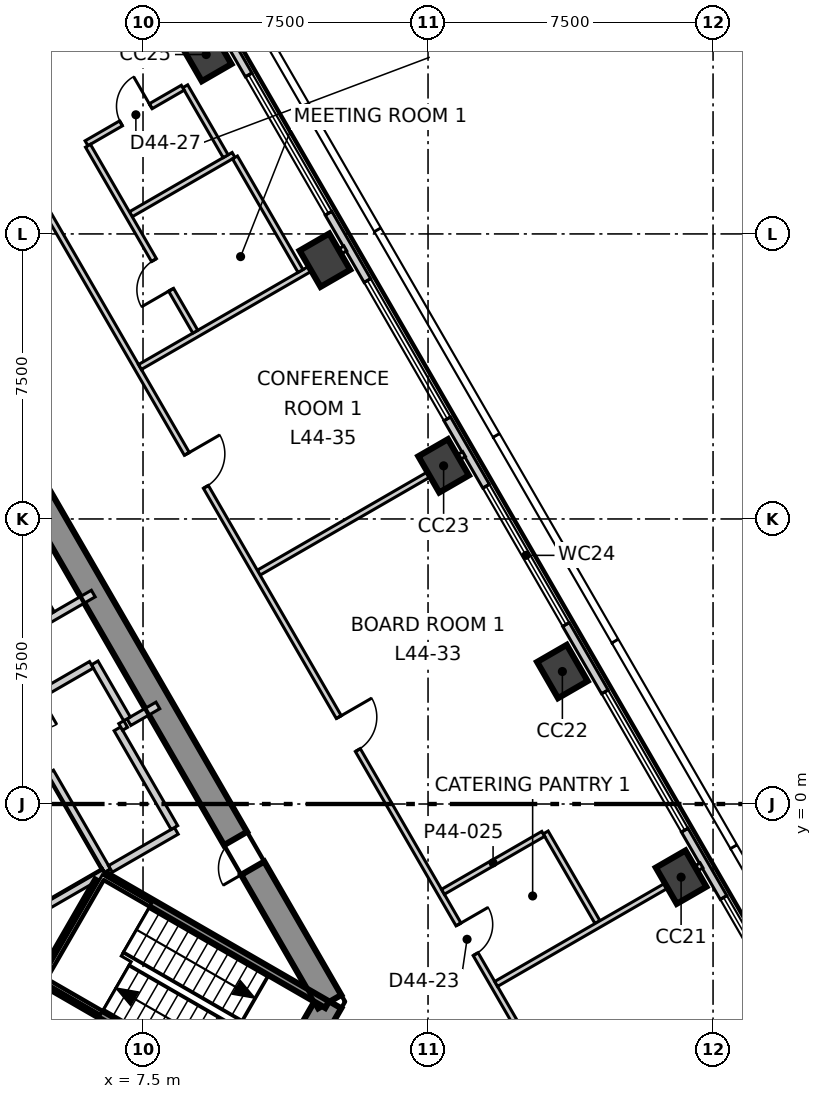
"""IFC4 building model, lengths in metres.
Left out: names, types, materials, properties, quantities, classifications, styles, units other than length and angle.
Written with IfcOpenShell. Run it as: python <this file> out.ifc"""

import sys

from ifc_helpers import new_model, si_unit, direction, frame, frame_2d, origin, origin_2d, place, context, subcontext, project, spatial, polyline, rectangle, outline, extrude, element, fill, save


model = new_model("IFC4")
c1 = context("Model", 3, precision=1e-05, world=origin(), true_north=direction((0.0, 1.0)))
c2 = subcontext(c1, "Body", "Model", "MODEL_VIEW")
j1 = project(units=[si_unit("LENGTHUNIT", "METRE"), si_unit("PLANEANGLEUNIT", "RADIAN")], contexts=[c1])
p1 = place(None, origin())
s1 = spatial("IfcSite", under=j1, at=p1, CompositionType="ELEMENT")
p2 = place(p1, origin())
s2 = spatial("IfcBuilding", under=s1, at=p2, CompositionType="ELEMENT")
p3 = place(p2, frame((0.0, 0.0, 191.3)))
s3 = spatial("IfcBuildingStorey", under=s2, at=p3, CompositionType="ELEMENT", Elevation=191.3)
p4 = place(p3, frame((10.71, -8.15, -0.3), z_axis=(0.0, 0.0, 1.0), x_axis=(0.49999337185, 0.866029230515, 0.0)))
e1 = element("IfcWall", 1, at=p4, inside=s3, PredefinedType="SHEAR", context=c2, shape_type="SweptSolid", body=[
    extrude(outline(polyline([(-0.202, -0.35), (1.703, -0.35), (3.608, -0.35), (3.204, 0.35), (1.703, 0.35), (0.202, 0.35), (-0.202, -0.35)])), origin(), (0.0, 0.0, 1.0), 4.0),
])
p5 = place(p4, frame((1.003, 0.0, 0.3)))
e2 = element("IfcOpeningElement", 2, at=p5, cuts=e1, PredefinedType="OPENING", context=c2, shape_type="SweptSolid", body=[
    extrude(rectangle(XDim=1.4, YDim=2.1, at=frame_2d((0.7, 1.05))), frame((0.0, 0.36, 0.0), z_axis=(0.0, -1.0, 0.0), x_axis=(1.0, 0.0, 0.0)), (0.0, 0.0, 1.0), 0.72),
])
p6 = place(p3, frame((12.413, -5.2, -0.3), z_axis=(0.0, 0.0, 1.0), x_axis=(-0.500011533395, 0.866018744874, 0.0)))
e3 = element("IfcWall", 3, at=p6, inside=s3, PredefinedType="SHEAR", context=c2, shape_type="SweptSolid", body=[
    extrude(outline(polyline([(-0.202, -0.35), (1.782, -0.35), (3.766, -0.35), (5.75, -0.35), (7.734, -0.35), (9.718, -0.35), (11.702, -0.35), (13.686, -0.35), (15.67, -0.35), (17.654, -0.35), (19.638, -0.35), (21.622, -0.35), (21.218, 0.35), (19.307, 0.35), (17.397, 0.35), (15.486, 0.35), (13.576, 0.35), (11.665, 0.35), (9.755, 0.35), (7.844, 0.35), (5.934, 0.35), (4.023, 0.35), (2.113, 0.35), (0.202, 0.35), (-0.202, -0.35)])), origin(), (0.0, 0.0, 1.0), 4.0),
])
p7 = place(p6, frame((4.055, 0.0, 0.3)))
e4 = element("IfcOpeningElement", 4, at=p7, cuts=e3, PredefinedType="OPENING", context=c2, shape_type="SweptSolid", body=[
    extrude(rectangle(XDim=0.9, YDim=2.1, at=frame_2d((0.45, 1.05))), frame((0.0, 0.36, 0.0), z_axis=(0.0, -1.0, 0.0), x_axis=(1.0, 0.0, 0.0)), (0.0, 0.0, 1.0), 0.72),
])
p8 = place(p6, frame((16.465, 0.0, 0.3)))
e5 = element("IfcOpeningElement", 5, at=p8, cuts=e3, PredefinedType="OPENING", context=c2, shape_type="SweptSolid", body=[
    extrude(rectangle(XDim=0.9, YDim=2.1, at=frame_2d((0.45, 1.05))), frame((0.0, 0.36, 0.0), z_axis=(0.0, -1.0, 0.0), x_axis=(1.0, 0.0, 0.0)), (0.0, 0.0, 1.0), 0.72),
])
for number, where, z_axis, x_axis in (
    (6, (21.659, -1.925, -0.3), (0.0, 0.0, 1.0), (-0.5, 0.866, 0.0)),
    (7, (18.535, 3.486, -0.3), (0.0, 0.0, 1.0), (-0.5, 0.866, 0.0)),
    (8, (15.41, 8.898, -0.3), (0.0, 0.0, 1.0), (-0.5, 0.866, 0.0)),
    (9, (12.286, 14.309, -0.3), (0.0, 0.0, 1.0), (-0.5, 0.866, 0.0)),
    (10, (9.162, 19.72, -0.3), (0.0, 0.0, 1.0), (-0.5, 0.866, 0.0)),
):
    element("IfcColumn", number, at=place(p3, frame(where, z_axis=z_axis, x_axis=x_axis)), inside=s3, PredefinedType="COLUMN", context=c2, shape_type="SweptSolid", body=[
        extrude(rectangle(XDim=1.1, YDim=0.9, at=origin_2d()), origin(), (0.0, 0.0, 1.0), 4.0),
    ])
p9 = place(p3, frame((29.165, -13.525, 0.0), z_axis=(0.0, 0.0, 1.0), x_axis=(-0.500008941164, 0.86602024154, 0.0)))
e11 = element("IfcWall", 11, at=p9, inside=s3, PredefinedType="ELEMENTEDWALL", context=c2, shape_type="SweptSolid", body=[
    extrude(rectangle(XDim=52.571, YDim=0.2, at=frame_2d((26.286, 0.0))), origin(), (0.0, 0.0, 1.0), 3.7),
])
p10 = place(p9, frame((2.327, 0.0, 0.9)))
e12 = element("IfcOpeningElement", 12, at=p10, cuts=e11, PredefinedType="OPENING", context=c2, shape_type="SweptSolid", body=[
    extrude(rectangle(XDim=4.2, YDim=2.5, at=frame_2d((2.1, 1.25))), frame((0.0, 0.11, 0.0), z_axis=(0.0, -1.0, 0.0), x_axis=(1.0, 0.0, 0.0)), (0.0, 0.0, 1.0), 0.22),
])
p11 = place(p9, frame((8.575, 0.0, 0.9)))
e13 = element("IfcOpeningElement", 13, at=p11, cuts=e11, PredefinedType="OPENING", context=c2, shape_type="SweptSolid", body=[
    extrude(rectangle(XDim=4.2, YDim=2.5, at=frame_2d((2.1, 1.25))), frame((0.0, 0.11, 0.0), z_axis=(0.0, -1.0, 0.0), x_axis=(1.0, 0.0, 0.0)), (0.0, 0.0, 1.0), 0.22),
])
p12 = place(p9, frame((14.823, 0.0, 0.9)))
e14 = element("IfcOpeningElement", 14, at=p12, cuts=e11, PredefinedType="OPENING", context=c2, shape_type="SweptSolid", body=[
    extrude(rectangle(XDim=4.2, YDim=2.5, at=frame_2d((2.1, 1.25))), frame((0.0, 0.11, 0.0), z_axis=(0.0, -1.0, 0.0), x_axis=(1.0, 0.0, 0.0)), (0.0, 0.0, 1.0), 0.22),
])
p13 = place(p9, frame((21.072, 0.0, 0.9)))
e15 = element("IfcOpeningElement", 15, at=p13, cuts=e11, PredefinedType="OPENING", context=c2, shape_type="SweptSolid", body=[
    extrude(rectangle(XDim=4.2, YDim=2.5, at=frame_2d((2.1, 1.25))), frame((0.0, 0.11, 0.0), z_axis=(0.0, -1.0, 0.0), x_axis=(1.0, 0.0, 0.0)), (0.0, 0.0, 1.0), 0.22),
])
p14 = place(p9, frame((27.32, 0.0, 0.9)))
e16 = element("IfcOpeningElement", 16, at=p14, cuts=e11, PredefinedType="OPENING", context=c2, shape_type="SweptSolid", body=[
    extrude(rectangle(XDim=4.2, YDim=2.5, at=frame_2d((2.1, 1.25))), frame((0.0, 0.11, 0.0), z_axis=(0.0, -1.0, 0.0), x_axis=(1.0, 0.0, 0.0)), (0.0, 0.0, 1.0), 0.22),
])
p15 = place(p9, frame((33.568, 0.0, 0.9)))
e17 = element("IfcOpeningElement", 17, at=p15, cuts=e11, PredefinedType="OPENING", context=c2, shape_type="SweptSolid", body=[
    extrude(rectangle(XDim=4.2, YDim=2.5, at=frame_2d((2.1, 1.25))), frame((0.0, 0.11, 0.0), z_axis=(0.0, -1.0, 0.0), x_axis=(1.0, 0.0, 0.0)), (0.0, 0.0, 1.0), 0.22),
])
p16 = place(p9, frame((39.816, 0.0, 0.9)))
e18 = element("IfcOpeningElement", 18, at=p16, cuts=e11, PredefinedType="OPENING", context=c2, shape_type="SweptSolid", body=[
    extrude(rectangle(XDim=4.2, YDim=2.5, at=frame_2d((2.1, 1.25))), frame((0.0, 0.11, 0.0), z_axis=(0.0, -1.0, 0.0), x_axis=(1.0, 0.0, 0.0)), (0.0, 0.0, 1.0), 0.22),
])
p17 = place(p9, frame((46.064, 0.0, 0.9)))
e19 = element("IfcOpeningElement", 19, at=p17, cuts=e11, PredefinedType="OPENING", context=c2, shape_type="SweptSolid", body=[
    extrude(rectangle(XDim=4.2, YDim=2.5, at=frame_2d((2.1, 1.25))), frame((0.0, 0.11, 0.0), z_axis=(0.0, -1.0, 0.0), x_axis=(1.0, 0.0, 0.0)), (0.0, 0.0, 1.0), 0.22),
])
p18 = place(p3, frame((10.544, 6.087, 0.0), z_axis=(0.0, 0.0, 1.0), x_axis=(0.86601944389, 0.500010322698, 0.0)))
e20 = element("IfcWall", 20, at=p18, inside=s3, PredefinedType="PARTITIONING", context=c2, shape_type="SweptSolid", body=[
    extrude(rectangle(XDim=6.24, YDim=0.15, at=frame_2d((3.12, 0.0))), origin(), (0.0, 0.0, 1.0), 3.2),
])
p19 = place(p3, frame((0.075, 24.07, 0.0), z_axis=(0.0, 0.0, 1.0), x_axis=(0.49999939571, -0.866025752671, 0.0)))
e21 = element("IfcWall", 21, at=p19, inside=s3, PredefinedType="PARTITIONING", context=c2, shape_type="SweptSolid", body=[
    extrude(rectangle(XDim=41.614, YDim=0.15, at=frame_2d((20.807, 0.0))), origin(), (0.0, 0.0, 1.0), 3.7),
])
p20 = place(p19, frame((37.015, 0.0, 0.0)))
e22 = element("IfcOpeningElement", 22, at=p20, cuts=e21, PredefinedType="OPENING", context=c2, shape_type="SweptSolid", body=[
    extrude(rectangle(XDim=1.1, YDim=2.1, at=frame_2d((0.55, 1.05))), frame((0.0, 0.085, 0.0), z_axis=(0.0, -1.0, 0.0), x_axis=(1.0, 0.0, 0.0)), (0.0, 0.0, 1.0), 0.17),
])
p21 = place(p19, frame((25.154, 0.0, 0.0)))
e23 = element("IfcOpeningElement", 23, at=p21, cuts=e21, PredefinedType="OPENING", context=c2, shape_type="SweptSolid", body=[
    extrude(rectangle(XDim=1.0, YDim=2.1, at=frame_2d((0.5, 1.05))), frame((0.0, 0.085, 0.0), z_axis=(0.0, -1.0, 0.0), x_axis=(1.0, 0.0, 0.0)), (0.0, 0.0, 1.0), 0.17),
])
p22 = place(p19, frame((31.454, 0.0, 0.0)))
e24 = element("IfcOpeningElement", 24, at=p22, cuts=e21, PredefinedType="OPENING", context=c2, shape_type="SweptSolid", body=[
    extrude(rectangle(XDim=0.9, YDim=2.1, at=frame_2d((0.45, 1.05))), frame((0.0, 0.085, 0.0), z_axis=(0.0, -1.0, 0.0), x_axis=(1.0, 0.0, 0.0)), (0.0, 0.0, 1.0), 0.17),
])
p23 = place(p19, frame((17.157, 0.0, 0.0)))
e25 = element("IfcOpeningElement", 25, at=p23, cuts=e21, PredefinedType="OPENING", context=c2, shape_type="SweptSolid", body=[
    extrude(rectangle(XDim=1.0, YDim=2.1, at=frame_2d((0.5, 1.05))), frame((0.0, 0.085, 0.0), z_axis=(0.0, -1.0, 0.0), x_axis=(1.0, 0.0, 0.0)), (0.0, 0.0, 1.0), 0.17),
])
p24 = place(p19, frame((6.609, 0.0, 0.0)))
e26 = element("IfcOpeningElement", 26, at=p24, cuts=e21, PredefinedType="OPENING", context=c2, shape_type="SweptSolid", body=[
    extrude(rectangle(XDim=1.1, YDim=2.1, at=frame_2d((0.55, 1.05))), frame((0.0, 0.085, 0.0), z_axis=(0.0, -1.0, 0.0), x_axis=(1.0, 0.0, 0.0)), (0.0, 0.0, 1.0), 0.17),
])
p25 = place(p3, frame((7.419, 11.499, 0.0), z_axis=(0.0, 0.0, 1.0), x_axis=(0.866036385336, 0.499980978912, 0.0)))
e27 = element("IfcWall", 27, at=p25, inside=s3, PredefinedType="PARTITIONING", context=c2, shape_type="SweptSolid", body=[
    extrude(rectangle(XDim=6.24, YDim=0.15, at=frame_2d((3.12, 0.0))), origin(), (0.0, 0.0, 1.0), 3.7),
])
p26 = place(p3, frame((18.096, -0.749, 0.0), z_axis=(0.0, 0.0, 1.0), x_axis=(0.500156697144, -0.865934915743, 0.0)))
e28 = element("IfcWall", 28, at=p26, inside=s3, PredefinedType="PARTITIONING", context=c2, shape_type="SweptSolid", body=[
    extrude(rectangle(XDim=2.725, YDim=0.15, at=frame_2d((1.363, 0.0))), origin(), (0.0, 0.0, 1.0), 3.7),
])
p27 = place(p3, frame((15.392, -2.31, 0.0), z_axis=(0.0, 0.0, 1.0), x_axis=(0.865941409278, 0.50014545454, 0.0)))
e29 = element("IfcWall", 29, at=p27, inside=s3, PredefinedType="PARTITIONING", context=c2, shape_type="SweptSolid", body=[
    extrude(rectangle(XDim=3.047, YDim=0.15, at=frame_2d((1.524, 0.0))), origin(), (0.0, 0.0, 1.0), 3.7),
])
p28 = place(p3, frame((16.792, -4.735, 0.0), z_axis=(0.0, 0.0, 1.0), x_axis=(0.86601944389, 0.500010322698, 0.0)))
e30 = element("IfcWall", 30, at=p28, inside=s3, PredefinedType="PARTITIONING", context=c2, shape_type="SweptSolid", body=[
    extrude(rectangle(XDim=6.24, YDim=0.15, at=frame_2d((3.12, 0.0))), origin(), (0.0, 0.0, 1.0), 3.7),
])
p29 = place(p3, frame((7.178, 15.517, 0.0), z_axis=(0.0, 0.0, 1.0), x_axis=(0.866084027935, 0.499898446243, 0.0)))
e31 = element("IfcWall", 31, at=p29, inside=s3, PredefinedType="PARTITIONING", context=c2, shape_type="SweptSolid", body=[
    extrude(rectangle(XDim=3.122, YDim=0.15, at=frame_2d((1.561, 0.0))), origin(), (0.0, 0.0, 1.0), 3.7),
])
p30 = place(p3, frame((8.611, 18.885, 0.0), z_axis=(0.0, 0.0, 1.0), x_axis=(0.500017365573, -0.866015377534, 0.0)))
e32 = element("IfcWall", 32, at=p30, inside=s3, PredefinedType="PARTITIONING", context=c2, shape_type="SweptSolid", body=[
    extrude(rectangle(XDim=2.126, YDim=0.15, at=frame_2d((1.063, 0.0))), origin(), (0.0, 0.0, 1.0), 3.7),
])
p31 = place(p3, frame((6.013, 17.385, 0.0), z_axis=(0.0, 0.0, 1.0), x_axis=(0.866098016745, 0.499874209568, 0.0)))
e33 = element("IfcWall", 33, at=p31, inside=s3, PredefinedType="PARTITIONING", context=c2, shape_type="SweptSolid", body=[
    extrude(rectangle(XDim=2.925, YDim=0.15, at=frame_2d((1.462, 0.0))), origin(), (0.0, 0.0, 1.0), 3.7),
])
p32 = place(p31, frame((1.05, 0.0, 0.0)))
e34 = element("IfcOpeningElement", 34, at=p32, cuts=e33, PredefinedType="OPENING", context=c2, shape_type="SweptSolid", body=[
    extrude(rectangle(XDim=0.9, YDim=2.1, at=frame_2d((0.45, 1.05))), frame((0.0, 0.085, 0.0), z_axis=(0.0, -1.0, 0.0), x_axis=(1.0, 0.0, 0.0)), (0.0, 0.0, 1.0), 0.17),
])
p33 = place(p3, frame((6.051, 17.32, 0.0), z_axis=(0.0, 0.0, 1.0), x_axis=(0.499991765245, -0.86603015807, 0.0)))
e35 = element("IfcWall", 35, at=p33, inside=s3, PredefinedType="PARTITIONING", context=c2, shape_type="SweptSolid", body=[
    extrude(rectangle(XDim=5.65, YDim=0.15, at=frame_2d((2.825, 0.0))), origin(), (0.0, 0.0, 1.0), 3.7),
])
p34 = place(p33, frame((3.475, 0.0, 0.0)))
e36 = element("IfcOpeningElement", 36, at=p34, cuts=e35, PredefinedType="OPENING", context=c2, shape_type="SweptSolid", body=[
    extrude(rectangle(XDim=0.9, YDim=2.1, at=frame_2d((0.45, 1.05))), frame((0.0, 0.085, 0.0), z_axis=(0.0, -1.0, 0.0), x_axis=(1.0, 0.0, 0.0)), (0.0, 0.0, 1.0), 0.17),
])
p35 = place(p3, frame((9.92, 17.013, 0.0), z_axis=(0.0, 0.0, 1.0), x_axis=(0.49998991961, -0.866031223622, 0.0)))
e37 = element("IfcWall", 37, at=p35, inside=s3, PredefinedType="PARTITIONING", context=c2, shape_type="SweptSolid", body=[
    extrude(rectangle(XDim=3.45, YDim=0.15, at=frame_2d((1.725, 0.0))), origin(), (0.0, 0.0, 1.0), 3.7),
])
p36 = place(p3, frame((1.578, 2.874, 0.0), z_axis=(0.0, 0.0, 1.0), x_axis=(0.866045911672, 0.499964477614, 0.0)))
e38 = element("IfcWall", 38, at=p36, inside=s3, PredefinedType="SOLIDWALL", context=c2, shape_type="SweptSolid", body=[
    extrude(rectangle(XDim=5.327, YDim=0.2, at=frame_2d((2.663, 0.0))), origin(), (0.0, 0.0, 1.0), 3.7),
])
p37 = place(p36, frame((2.496, 0.0, 0.0)))
e39 = element("IfcOpeningElement", 39, at=p37, cuts=e38, PredefinedType="OPENING", context=c2, shape_type="SweptSolid", body=[
    extrude(rectangle(XDim=1.1, YDim=2.1, at=frame_2d((0.55, 1.05))), frame((0.0, 0.11, 0.0), z_axis=(0.0, -1.0, 0.0), x_axis=(1.0, 0.0, 0.0)), (0.0, 0.0, 1.0), 0.22),
])
p38 = place(p3, frame((7.129, 2.153, 0.0), z_axis=(0.0, 0.0, 1.0), x_axis=(0.866083962871, 0.499898558967, 0.0)))
e40 = element("IfcWall", 40, at=p38, inside=s3, PredefinedType="SOLIDWALL", context=c2, shape_type="SweptSolid", body=[
    extrude(rectangle(XDim=0.88, YDim=0.2, at=frame_2d((0.44, 0.0))), origin(), (0.0, 0.0, 1.0), 3.7),
])
p39 = place(p3, frame((3.626, 7.52, 0.0), z_axis=(0.0, 0.0, 1.0), x_axis=(0.500060147554, -0.865990674793, 0.0)))
e41 = element("IfcWall", 41, at=p39, inside=s3, PredefinedType="SOLIDWALL", context=c2, shape_type="SweptSolid", body=[
    extrude(rectangle(XDim=2.9, YDim=0.2, at=frame_2d((1.45, 0.0))), origin(), (0.0, 0.0, 1.0), 3.7),
])
p40 = place(p3, frame((5.057, 0.841, 0.0), z_axis=(0.0, 0.0, 1.0), x_axis=(0.499990139034, -0.866031096941, 0.0)))
e42 = element("IfcWall", 42, at=p40, inside=s3, PredefinedType="SOLIDWALL", context=c2, shape_type="SweptSolid", body=[
    extrude(rectangle(XDim=3.0, YDim=0.2, at=frame_2d((1.5, 0.0))), origin(), (0.0, 0.0, 1.0), 3.7),
])
p41 = place(p3, frame((4.9, -2.714, 0.0), z_axis=(0.0, 0.0, 1.0), x_axis=(0.865846928409, 0.500309001083, 0.0)))
e43 = element("IfcWall", 43, at=p41, inside=s3, PredefinedType="SOLIDWALL", context=c2, shape_type="SweptSolid", body=[
    extrude(rectangle(XDim=1.813, YDim=0.2, at=frame_2d((0.907, 0.0))), origin(), (0.0, 0.0, 1.0), 3.7),
])
p42 = place(p3, frame((6.229, 3.712, 0.0), z_axis=(0.0, 0.0, 1.0), x_axis=(0.499875724984, -0.86609714211, 0.0)))
e44 = element("IfcWall", 44, at=p42, inside=s3, PredefinedType="SOLIDWALL", context=c2, shape_type="SweptSolid", body=[
    extrude(rectangle(XDim=1.701, YDim=0.2, at=frame_2d((0.85, 0.0))), origin(), (0.0, 0.0, 1.0), 3.7),
])
p43 = place(p3, frame((2.548, 1.587, 0.0), z_axis=(0.0, 0.0, 1.0), x_axis=(0.866004344652, 0.500036473714, 0.0)))
e45 = element("IfcWall", 45, at=p43, inside=s3, PredefinedType="SOLIDWALL", context=c2, shape_type="SweptSolid", body=[
    extrude(rectangle(XDim=4.15, YDim=0.2, at=frame_2d((2.075, 0.0))), origin(), (0.0, 0.0, 1.0), 3.7),
])
p44 = place(p43, frame((1.675, 0.0, 0.0)))
e46 = element("IfcOpeningElement", 46, at=p44, cuts=e45, PredefinedType="OPENING", context=c2, shape_type="SweptSolid", body=[
    extrude(rectangle(XDim=0.9, YDim=2.1, at=frame_2d((0.45, 1.05))), frame((0.0, 0.11, 0.0), z_axis=(0.0, -1.0, 0.0), x_axis=(1.0, 0.0, 0.0)), (0.0, 0.0, 1.0), 0.22),
])
p45 = place(p3, frame((6.642, -1.708, 0.0), z_axis=(0.0, 0.0, 1.0), x_axis=(0.866043441391, 0.499968756647, 0.0)))
e47 = element("IfcWall", 47, at=p45, inside=s3, PredefinedType="SOLIDWALL", context=c2, shape_type="SweptSolid", body=[
    extrude(rectangle(XDim=2.002, YDim=0.2, at=frame_2d((1.001, 0.0))), origin(), (0.0, 0.0, 1.0), 3.7),
])
p46 = place(p3, frame((6.826, 1.978, 0.0), z_axis=(0.0, 0.0, 1.0), x_axis=(0.499990139034, -0.866031096941, 0.0)))
e48 = element("IfcWall", 48, at=p46, inside=s3, PredefinedType="SOLIDWALL", context=c2, shape_type="SweptSolid", body=[
    extrude(rectangle(XDim=3.0, YDim=0.2, at=frame_2d((1.5, 0.0))), origin(), (0.0, 0.0, 1.0), 3.7),
])
p47 = place(p3, frame((6.912, 2.028, 0.0), z_axis=(0.0, 0.0, 1.0), x_axis=(0.866559367082, 0.499074005857, 0.0)))
e49 = element("IfcWall", 49, at=p47, inside=s3, PredefinedType="SOLIDWALL", context=c2, shape_type="SweptSolid", body=[
    extrude(rectangle(XDim=0.152, YDim=0.2, at=frame_2d((0.076, 0.0))), origin(), (0.0, 0.0, 1.0), 3.7),
])
p48 = place(p3, frame((4.929, -4.693, 0.0), z_axis=(0.0, 0.0, 1.0), x_axis=(0.865983344943, -0.500072840975, 0.0)))
e50 = element("IfcWall", 50, at=p48, inside=s3, PredefinedType="SOLIDWALL", context=c2, shape_type="SweptSolid", body=[
    extrude(rectangle(XDim=6.715, YDim=0.2, at=frame_2d((3.357, 0.0))), origin(), (0.0, 0.0, 1.0), 3.7),
])
p49 = place(p3, frame((4.929, -4.462, 0.0), z_axis=(0.0, 0.0, 1.0), x_axis=(0.500200581029, 0.865909567298, 0.0)))
e51 = element("IfcWall", 51, at=p49, inside=s3, PredefinedType="SOLIDWALL", context=c2, shape_type="SweptSolid", body=[
    extrude(rectangle(XDim=2.799, YDim=0.2, at=frame_2d((1.399, 0.0))), origin(), (0.0, 0.0, 1.0), 3.7),
])
p50 = place(p3, frame((6.529, -1.922, 0.0), z_axis=(0.0, 0.0, 1.0), x_axis=(0.866046323291, -0.499963764601, 0.0)))
e52 = element("IfcWall", 52, at=p50, inside=s3, PredefinedType="SOLIDWALL", context=c2, shape_type="SweptSolid", body=[
    extrude(rectangle(XDim=6.714, YDim=0.2, at=frame_2d((3.357, 0.0))), origin(), (0.0, 0.0, 1.0), 3.7),
])
p51 = place(p11, origin())
e53 = element("IfcWindow", 53, at=p51, inside=s3, PartitioningType="SINGLE_PANEL", PredefinedType="WINDOW", context=c2, shape_type="SweptSolid", body=[
    extrude(rectangle(XDim=4.2, YDim=2.5, at=frame_2d((2.1, 1.25))), frame((0.0, 0.03, 0.0), z_axis=(0.0, -1.0, 0.0), x_axis=(1.0, 0.0, 0.0)), (0.0, 0.0, 1.0), 0.06),
])
fill(e13, e53)
p52 = place(p12, origin())
e54 = element("IfcWindow", 54, at=p52, inside=s3, PartitioningType="SINGLE_PANEL", PredefinedType="WINDOW", context=c2, shape_type="SweptSolid", body=[
    extrude(rectangle(XDim=4.2, YDim=2.5, at=frame_2d((2.1, 1.25))), frame((0.0, 0.03, 0.0), z_axis=(0.0, -1.0, 0.0), x_axis=(1.0, 0.0, 0.0)), (0.0, 0.0, 1.0), 0.06),
])
fill(e14, e54)
p53 = place(p13, origin())
e55 = element("IfcWindow", 55, at=p53, inside=s3, PartitioningType="SINGLE_PANEL", PredefinedType="WINDOW", context=c2, shape_type="SweptSolid", body=[
    extrude(rectangle(XDim=4.2, YDim=2.5, at=frame_2d((2.1, 1.25))), frame((0.0, 0.03, 0.0), z_axis=(0.0, -1.0, 0.0), x_axis=(1.0, 0.0, 0.0)), (0.0, 0.0, 1.0), 0.06),
])
fill(e15, e55)
p54 = place(p14, origin())
e56 = element("IfcWindow", 56, at=p54, inside=s3, PartitioningType="SINGLE_PANEL", PredefinedType="WINDOW", context=c2, shape_type="SweptSolid", body=[
    extrude(rectangle(XDim=4.2, YDim=2.5, at=frame_2d((2.1, 1.25))), frame((0.0, 0.03, 0.0), z_axis=(0.0, -1.0, 0.0), x_axis=(1.0, 0.0, 0.0)), (0.0, 0.0, 1.0), 0.06),
])
fill(e16, e56)
p55 = place(p15, origin())
e57 = element("IfcWindow", 57, at=p55, inside=s3, PartitioningType="SINGLE_PANEL", PredefinedType="WINDOW", context=c2, shape_type="SweptSolid", body=[
    extrude(rectangle(XDim=4.2, YDim=2.5, at=frame_2d((2.1, 1.25))), frame((0.0, 0.03, 0.0), z_axis=(0.0, -1.0, 0.0), x_axis=(1.0, 0.0, 0.0)), (0.0, 0.0, 1.0), 0.06),
])
fill(e17, e57)
p56 = place(p21, origin())
e58 = element("IfcDoor", 58, at=p56, inside=s3, OperationType="SINGLE_SWING_RIGHT", PredefinedType="DOOR", context=c2, shape_type="SweptSolid", body=[
    extrude(rectangle(XDim=1.0, YDim=2.1, at=frame_2d((0.5, 1.05))), frame((0.0, 0.025, 0.0), z_axis=(0.0, -1.0, 0.0), x_axis=(1.0, 0.0, 0.0)), (0.0, 0.0, 1.0), 0.05),
])
fill(e23, e58)
p57 = place(p22, origin())
e59 = element("IfcDoor", 59, at=p57, inside=s3, OperationType="SINGLE_SWING_RIGHT", PredefinedType="DOOR", context=c2, shape_type="SweptSolid", body=[
    extrude(rectangle(XDim=0.9, YDim=2.1, at=frame_2d((0.45, 1.05))), frame((0.0, 0.025, 0.0), z_axis=(0.0, -1.0, 0.0), x_axis=(1.0, 0.0, 0.0)), (0.0, 0.0, 1.0), 0.05),
])
fill(e24, e59)
p58 = place(p23, origin())
e60 = element("IfcDoor", 60, at=p58, inside=s3, OperationType="SINGLE_SWING_RIGHT", PredefinedType="DOOR", context=c2, shape_type="SweptSolid", body=[
    extrude(rectangle(XDim=1.0, YDim=2.1, at=frame_2d((0.5, 1.05))), frame((0.0, 0.025, 0.0), z_axis=(0.0, -1.0, 0.0), x_axis=(1.0, 0.0, 0.0)), (0.0, 0.0, 1.0), 0.05),
])
fill(e25, e60)
p59 = place(p34, origin())
e61 = element("IfcDoor", 61, at=p59, inside=s3, OperationType="SINGLE_SWING_RIGHT", PredefinedType="DOOR", context=c2, shape_type="SweptSolid", body=[
    extrude(rectangle(XDim=0.9, YDim=2.1, at=frame_2d((0.45, 1.05))), frame((0.0, 0.025, 0.0), z_axis=(0.0, -1.0, 0.0), x_axis=(1.0, 0.0, 0.0)), (0.0, 0.0, 1.0), 0.05),
])
fill(e36, e61)
p60 = place(p32, origin())
e62 = element("IfcDoor", 62, at=p60, inside=s3, OperationType="SINGLE_SWING_LEFT", PredefinedType="DOOR", context=c2, shape_type="SweptSolid", body=[
    extrude(rectangle(XDim=0.9, YDim=2.1, at=frame_2d((0.45, 1.05))), frame((0.0, 0.025, 0.0), z_axis=(0.0, -1.0, 0.0), x_axis=(1.0, 0.0, 0.0)), (0.0, 0.0, 1.0), 0.05),
])
fill(e34, e62)
p61 = place(p7, origin())
e63 = element("IfcDoor", 63, at=p61, inside=s3, OperationType="SINGLE_SWING_RIGHT", PredefinedType="DOOR", context=c2, shape_type="SweptSolid", body=[
    extrude(rectangle(XDim=0.9, YDim=2.1, at=frame_2d((0.45, 1.05))), frame((0.0, 0.025, 0.0), z_axis=(0.0, -1.0, 0.0), x_axis=(1.0, 0.0, 0.0)), (0.0, 0.0, 1.0), 0.05),
])
fill(e4, e63)
save(model, sys.argv[1])
